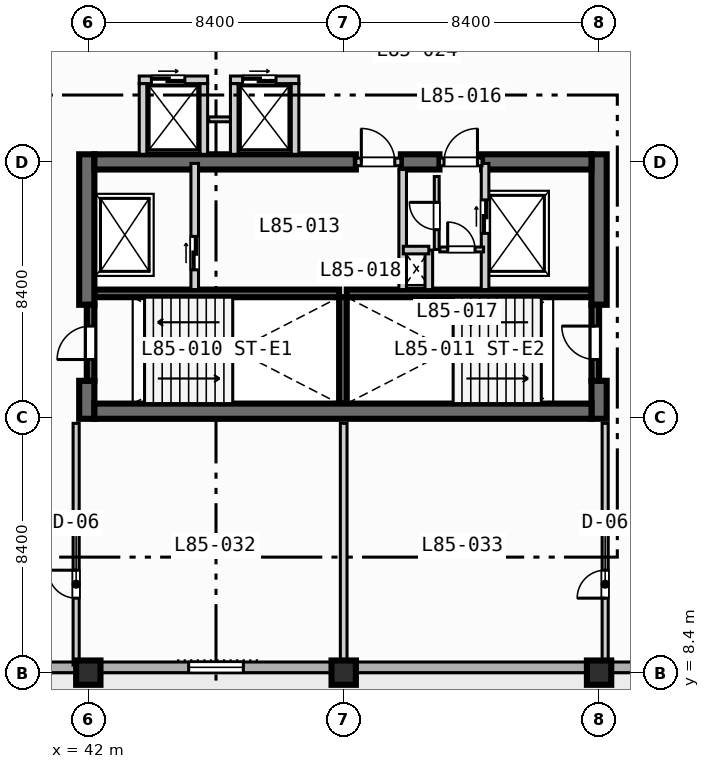
"""IFC4 building model, lengths in metres.
Left out: names, types, materials, properties, quantities, classifications, styles, units other than length and angle.
Written with IfcOpenShell. Run it as: python <this file> out.ifc"""

import sys

from ifc_helpers import new_model, si_unit, direction, frame, frame_2d, origin, origin_2d, place, context, subcontext, project, spatial, rectangle, extrude, element, fill, save


model = new_model("IFC4")
c1 = context("Model", 3, precision=1e-05, world=origin(), true_north=direction((0.0, 1.0)))
c2 = subcontext(c1, "Body", "Model", "MODEL_VIEW")
j1 = project(units=[si_unit("LENGTHUNIT", "METRE"), si_unit("PLANEANGLEUNIT", "RADIAN")], contexts=[c1])
p1 = place(None, origin())
s1 = spatial("IfcSite", under=j1, at=p1, CompositionType="ELEMENT")
p2 = place(p1, origin())
s2 = spatial("IfcBuilding", under=s1, at=p2, CompositionType="ELEMENT")
p3 = place(p2, frame((0.0, 0.0, 343.7)))
s3 = spatial("IfcBuildingStorey", under=s2, at=p3, CompositionType="ELEMENT", Elevation=343.7)
for number, where, z_axis, x_axis in (
    (1, (42.2, 20.875, 0.0), (0.0, 0.0, 1.0), (1.0, 0.0, 0.0)),
    (2, (50.5, 20.875, 0.0), (0.0, 0.0, 1.0), (1.0, 0.0, 0.0)),
):
    element("IfcWall", number, at=place(p3, frame(where, z_axis=z_axis, x_axis=x_axis)), inside=s3, PredefinedType="SOLIDWALL", context=c2, shape_type="SweptSolid", body=[
        extrude(rectangle(XDim=8.05, YDim=0.25, at=frame_2d((4.025, 0.0))), origin(), (0.0, 0.0, 1.0), 3.67),
    ])
p4 = place(p3, frame((50.375, 17.25, 0.0), z_axis=(0.0, 0.0, 1.0), x_axis=(0.0, 1.0, 0.0)))
e3 = element("IfcWall", 3, at=p4, inside=s3, PredefinedType="SOLIDWALL", context=c2, shape_type="SweptSolid", body=[
    extrude(rectangle(XDim=3.5, YDim=0.25, at=frame_2d((1.75, 0.0))), origin(), (0.0, 0.0, 1.0), 3.67),
])
p5 = place(p3, frame((41.95, 16.75, 0.0), z_axis=(0.0, 0.0, 1.0), x_axis=(0.0, 1.0, 0.0)))
e4 = element("IfcWall", 4, at=p5, inside=s3, PredefinedType="SHEAR", context=c2, shape_type="SweptSolid", body=[
    extrude(rectangle(XDim=1.25, YDim=0.5, at=frame_2d((0.625, 0.0))), origin(), (0.0, 0.0, 1.0), 3.67),
])
p6 = place(p3, frame((41.95, 20.5, 0.0), z_axis=(0.0, 0.0, 1.0), x_axis=(0.0, 1.0, 0.0)))
e5 = element("IfcWall", 5, at=p6, inside=s3, PredefinedType="SHEAR", context=c2, shape_type="SweptSolid", body=[
    extrude(rectangle(XDim=4.95, YDim=0.5, at=frame_2d((2.475, 0.0))), origin(), (0.0, 0.0, 1.0), 3.67),
])
p7 = place(p3, frame((58.8, 16.75, 0.0), z_axis=(0.0, 0.0, 1.0), x_axis=(0.0, 1.0, 0.0)))
e6 = element("IfcWall", 6, at=p7, inside=s3, PredefinedType="SHEAR", context=c2, shape_type="SweptSolid", body=[
    extrude(rectangle(XDim=1.25, YDim=0.5, at=frame_2d((0.625, 0.0))), origin(), (0.0, 0.0, 1.0), 3.67),
])
p8 = place(p3, frame((58.8, 20.5, 0.0), z_axis=(0.0, 0.0, 1.0), x_axis=(0.0, 1.0, 0.0)))
e7 = element("IfcWall", 7, at=p8, inside=s3, PredefinedType="SHEAR", context=c2, shape_type="SweptSolid", body=[
    extrude(rectangle(XDim=4.95, YDim=0.5, at=frame_2d((2.475, 0.0))), origin(), (0.0, 0.0, 1.0), 3.67),
])
p9 = place(p3, frame((42.2, 17.0, 0.0), z_axis=(0.0, 0.0, 1.0), x_axis=(1.0, 0.0, 0.0)))
e8 = element("IfcWall", 8, at=p9, inside=s3, PredefinedType="SHEAR", context=c2, shape_type="SweptSolid", body=[
    extrude(rectangle(XDim=16.35, YDim=0.5, at=frame_2d((8.175, 0.0))), origin(), (0.0, 0.0, 1.0), 3.67),
])
p10 = place(p3, frame((42.2, 25.2, 0.0), z_axis=(0.0, 0.0, 1.0), x_axis=(1.0, 0.0, 0.0)))
e9 = element("IfcWall", 9, at=p10, inside=s3, PredefinedType="SHEAR", context=c2, shape_type="SweptSolid", body=[
    extrude(rectangle(XDim=8.6, YDim=0.5, at=frame_2d((4.3, 0.0))), origin(), (0.0, 0.0, 1.0), 3.67),
])
p11 = place(p3, frame((52.28, 25.2, 0.0), z_axis=(0.0, 0.0, 1.0), x_axis=(1.0, 0.0, 0.0)))
e10 = element("IfcWall", 10, at=p11, inside=s3, PredefinedType="SHEAR", context=c2, shape_type="SweptSolid", body=[
    extrude(rectangle(XDim=1.27, YDim=0.5, at=frame_2d((0.635, 0.0))), origin(), (0.0, 0.0, 1.0), 3.67),
])
p12 = place(p3, frame((54.95, 25.2, 0.0), z_axis=(0.0, 0.0, 1.0), x_axis=(1.0, 0.0, 0.0)))
e11 = element("IfcWall", 11, at=p12, inside=s3, PredefinedType="SHEAR", context=c2, shape_type="SweptSolid", body=[
    extrude(rectangle(XDim=3.6, YDim=0.5, at=frame_2d((1.8, 0.0))), origin(), (0.0, 0.0, 1.0), 3.67),
])
for number, where, z_axis, x_axis in (
    (12, (42.0, 8.4, 0.0), (0.0, 0.0, 1.0), (1.0, 0.0, 0.0)),
    (13, (50.4, 8.4, 0.0), (0.0, 0.0, 1.0), (1.0, 0.0, 0.0)),
    (14, (58.8, 8.4, 0.0), (0.0, 0.0, 1.0), (1.0, 0.0, 0.0)),
):
    element("IfcColumn", number, at=place(p3, frame(where, z_axis=z_axis, x_axis=x_axis)), inside=s3, PredefinedType="COLUMN", context=c2, shape_type="SweptSolid", body=[
        extrude(rectangle(XDim=0.8, YDim=0.8, at=origin_2d()), origin(), (0.0, 0.0, 1.0), 3.9),
    ])
p13 = place(p3, frame((64.025, 8.575, 0.0), z_axis=(0.0, 0.0, 1.0), x_axis=(-1.0, 0.0, 0.0)))
e15 = element("IfcWall", 15, at=p13, inside=s3, PredefinedType="STANDARD", context=c2, shape_type="SweptSolid", body=[
    extrude(rectangle(XDim=52.45, YDim=0.35, at=frame_2d((26.225, 0.0))), origin(), (0.0, 0.0, 1.0), 3.67),
])
p14 = place(p13, frame((33.925, 0.0, 0.0)))
e16 = element("IfcOpeningElement", 16, at=p14, cuts=e15, PredefinedType="OPENING", context=c2, shape_type="SweptSolid", body=[
    extrude(rectangle(XDim=1.4, YDim=2.2, at=frame_2d((0.7, 1.1))), frame((0.0, 0.185, 0.0), z_axis=(0.0, -1.0, 0.0), x_axis=(1.0, 0.0, 0.0)), (0.0, 0.0, 1.0), 0.37),
])
p15 = place(p13, frame((25.025, 0.0, 0.85)))
e17 = element("IfcOpeningElement", 17, at=p15, cuts=e15, PredefinedType="OPENING", context=c2, shape_type="SweptSolid", body=[
    extrude(rectangle(XDim=2.4, YDim=1.95, at=frame_2d((1.2, 0.975))), frame((0.0, 0.185, 0.0), z_axis=(0.0, -1.0, 0.0), x_axis=(1.0, 0.0, 0.0)), (0.0, 0.0, 1.0), 0.37),
])
p16 = place(p13, frame((16.925, 0.0, 0.85)))
e18 = element("IfcOpeningElement", 18, at=p16, cuts=e15, PredefinedType="OPENING", context=c2, shape_type="SweptSolid", body=[
    extrude(rectangle(XDim=1.8, YDim=1.8, at=frame_2d((0.9, 0.9))), frame((0.0, 0.185, 0.0), z_axis=(0.0, -1.0, 0.0), x_axis=(1.0, 0.0, 0.0)), (0.0, 0.0, 1.0), 0.37),
])
p17 = place(p13, frame((41.815, 0.0, 0.85)))
e19 = element("IfcOpeningElement", 19, at=p17, cuts=e15, PredefinedType="OPENING", context=c2, shape_type="SweptSolid", body=[
    extrude(rectangle(XDim=1.8, YDim=1.8, at=frame_2d((0.9, 0.9))), frame((0.0, 0.185, 0.0), z_axis=(0.0, -1.0, 0.0), x_axis=(1.0, 0.0, 0.0)), (0.0, 0.0, 1.0), 0.37),
])
p18 = place(p13, frame((49.535, 0.0, 0.85)))
e20 = element("IfcOpeningElement", 20, at=p18, cuts=e15, PredefinedType="OPENING", context=c2, shape_type="SweptSolid", body=[
    extrude(rectangle(XDim=1.8, YDim=1.8, at=frame_2d((0.9, 0.9))), frame((0.0, 0.185, 0.0), z_axis=(0.0, -1.0, 0.0), x_axis=(1.0, 0.0, 0.0)), (0.0, 0.0, 1.0), 0.37),
])
p19 = place(p3, frame((42.075, 18.0, 0.0), z_axis=(0.0, 0.0, 1.0), x_axis=(0.0, 1.0, 0.0)))
e21 = element("IfcWall", 21, at=p19, inside=s3, PredefinedType="SOLIDWALL", context=c2, shape_type="SweptSolid", body=[
    extrude(rectangle(XDim=2.5, YDim=0.25, at=frame_2d((1.25, 0.0))), origin(), (0.0, 0.0, 1.0), 3.67),
])
p20 = place(p19, frame((0.7, 0.0, 0.0)))
e22 = element("IfcOpeningElement", 22, at=p20, cuts=e21, PredefinedType="OPENING", context=c2, shape_type="SweptSolid", body=[
    extrude(rectangle(XDim=1.1, YDim=2.15, at=frame_2d((0.55, 1.075))), frame((0.0, 0.135, 0.0), z_axis=(0.0, -1.0, 0.0), x_axis=(1.0, 0.0, 0.0)), (0.0, 0.0, 1.0), 0.27),
])
p21 = place(p3, frame((58.675, 18.0, 0.0), z_axis=(0.0, 0.0, 1.0), x_axis=(0.0, 1.0, 0.0)))
e23 = element("IfcWall", 23, at=p21, inside=s3, PredefinedType="SOLIDWALL", context=c2, shape_type="SweptSolid", body=[
    extrude(rectangle(XDim=2.5, YDim=0.25, at=frame_2d((1.25, 0.0))), origin(), (0.0, 0.0, 1.0), 3.67),
])
p22 = place(p21, frame((0.7, 0.0, 0.0)))
e24 = element("IfcOpeningElement", 24, at=p22, cuts=e23, PredefinedType="OPENING", context=c2, shape_type="SweptSolid", body=[
    extrude(rectangle(XDim=1.1, YDim=2.15, at=frame_2d((0.55, 1.075))), frame((0.0, 0.135, 0.0), z_axis=(0.0, -1.0, 0.0), x_axis=(1.0, 0.0, 0.0)), (0.0, 0.0, 1.0), 0.27),
])
p23 = place(p3, frame((45.5, 21.0, 0.0), z_axis=(0.0, 0.0, 1.0), x_axis=(0.0, 1.0, 0.0)))
e25 = element("IfcWall", 25, at=p23, inside=s3, PredefinedType="SOLIDWALL", context=c2, shape_type="SweptSolid", body=[
    extrude(rectangle(XDim=4.15, YDim=0.25, at=frame_2d((2.075, 0.0))), origin(), (0.0, 0.0, 1.0), 3.67),
])
p24 = place(p23, frame((0.65, 0.0, 0.0)))
e26 = element("IfcOpeningElement", 26, at=p24, cuts=e25, PredefinedType="OPENING", context=c2, shape_type="SweptSolid", body=[
    extrude(rectangle(XDim=1.1, YDim=2.15, at=frame_2d((0.55, 1.075))), frame((0.0, 0.135, 0.0), z_axis=(0.0, -1.0, 0.0), x_axis=(1.0, 0.0, 0.0)), (0.0, 0.0, 1.0), 0.27),
])
p25 = place(p3, frame((50.8, 25.2, 0.0), z_axis=(0.0, 0.0, 1.0), x_axis=(1.0, 0.0, 0.0)))
e27 = element("IfcWall", 27, at=p25, inside=s3, PredefinedType="SOLIDWALL", context=c2, shape_type="SweptSolid", body=[
    extrude(rectangle(XDim=1.48, YDim=0.25, at=frame_2d((0.74, 0.0))), origin(), (0.0, 0.0, 1.0), 3.67),
])
p26 = place(p25, frame((0.18, 0.0, 0.0)))
e28 = element("IfcOpeningElement", 28, at=p26, cuts=e27, PredefinedType="OPENING", context=c2, shape_type="SweptSolid", body=[
    extrude(rectangle(XDim=1.1, YDim=2.15, at=frame_2d((0.55, 1.075))), frame((0.0, 0.135, 0.0), z_axis=(0.0, -1.0, 0.0), x_axis=(1.0, 0.0, 0.0)), (0.0, 0.0, 1.0), 0.27),
])
p27 = place(p3, frame((52.34, 21.0, 0.0), z_axis=(0.0, 0.0, 1.0), x_axis=(0.0, 1.0, 0.0)))
e29 = element("IfcWall", 29, at=p27, inside=s3, PredefinedType="SOLIDWALL", context=c2, shape_type="SweptSolid", body=[
    extrude(rectangle(XDim=3.95, YDim=0.25, at=frame_2d((1.975, 0.0))), origin(), (0.0, 0.0, 1.0), 3.67),
])
p28 = place(p3, frame((55.05, 21.0, 0.0), z_axis=(0.0, 0.0, 1.0), x_axis=(0.0, 1.0, 0.0)))
e30 = element("IfcWall", 30, at=p28, inside=s3, PredefinedType="SOLIDWALL", context=c2, shape_type="SweptSolid", body=[
    extrude(rectangle(XDim=4.15, YDim=0.25, at=frame_2d((2.075, 0.0))), origin(), (0.0, 0.0, 1.0), 3.67),
])
p29 = place(p28, frame((1.85, 0.0, 0.0)))
e31 = element("IfcOpeningElement", 31, at=p29, cuts=e30, PredefinedType="OPENING", context=c2, shape_type="SweptSolid", body=[
    extrude(rectangle(XDim=1.1, YDim=2.15, at=frame_2d((0.55, 1.075))), frame((0.0, 0.135, 0.0), z_axis=(0.0, -1.0, 0.0), x_axis=(1.0, 0.0, 0.0)), (0.0, 0.0, 1.0), 0.27),
])
p30 = place(p3, frame((53.55, 25.2, 0.0), z_axis=(0.0, 0.0, 1.0), x_axis=(1.0, 0.0, 0.0)))
e32 = element("IfcWall", 32, at=p30, inside=s3, PredefinedType="SOLIDWALL", context=c2, shape_type="SweptSolid", body=[
    extrude(rectangle(XDim=1.4, YDim=0.25, at=frame_2d((0.7, 0.0))), origin(), (0.0, 0.0, 1.0), 3.67),
])
p31 = place(p30, frame((0.15, 0.0, 0.0)))
e33 = element("IfcOpeningElement", 33, at=p31, cuts=e32, PredefinedType="OPENING", context=c2, shape_type="SweptSolid", body=[
    extrude(rectangle(XDim=1.1, YDim=2.15, at=frame_2d((0.55, 1.075))), frame((0.0, 0.135, 0.0), z_axis=(0.0, -1.0, 0.0), x_axis=(1.0, 0.0, 0.0)), (0.0, 0.0, 1.0), 0.27),
])
p32 = place(p3, frame((53.2, 21.0, 0.0), z_axis=(0.0, 0.0, 1.0), x_axis=(0.0, 1.0, 0.0)))
e34 = element("IfcWall", 34, at=p32, inside=s3, PredefinedType="SOLIDWALL", context=c2, shape_type="SweptSolid", body=[
    extrude(rectangle(XDim=1.3, YDim=0.25, at=frame_2d((0.65, 0.0))), origin(), (0.0, 0.0, 1.0), 3.67),
])
p33 = place(p3, frame((52.36, 22.3, 0.0), z_axis=(0.0, 0.0, 1.0), x_axis=(1.0, 0.0, 0.0)))
e35 = element("IfcWall", 35, at=p33, inside=s3, PredefinedType="SOLIDWALL", context=c2, shape_type="SweptSolid", body=[
    extrude(rectangle(XDim=0.84, YDim=0.25, at=frame_2d((0.42, 0.0))), origin(), (0.0, 0.0, 1.0), 3.67),
])
p34 = place(p3, frame((53.56, 22.32, 0.0), z_axis=(0.0, 0.0, 1.0), x_axis=(1.0, 0.0, 0.0)))
e36 = element("IfcWall", 36, at=p34, inside=s3, PredefinedType="PARTITIONING", context=c2, shape_type="SweptSolid", body=[
    extrude(rectangle(XDim=1.44, YDim=0.16, at=frame_2d((0.72, 0.0))), origin(), (0.0, 0.0, 1.0), 3.67),
])
p35 = place(p34, frame((0.26, 0.0, 0.0)))
e37 = element("IfcOpeningElement", 37, at=p35, cuts=e36, PredefinedType="OPENING", context=c2, shape_type="SweptSolid", body=[
    extrude(rectangle(XDim=0.9, YDim=2.1, at=frame_2d((0.45, 1.05))), frame((0.0, 0.09, 0.0), z_axis=(0.0, -1.0, 0.0), x_axis=(1.0, 0.0, 0.0)), (0.0, 0.0, 1.0), 0.18),
])
p36 = place(p3, frame((53.46, 22.32, 0.0), z_axis=(0.0, 0.0, 1.0), x_axis=(0.0, 1.0, 0.0)))
e38 = element("IfcWall", 38, at=p36, inside=s3, PredefinedType="PARTITIONING", context=c2, shape_type="SweptSolid", body=[
    extrude(rectangle(XDim=2.4, YDim=0.16, at=frame_2d((1.2, 0.0))), origin(), (0.0, 0.0, 1.0), 3.67),
])
p37 = place(p36, frame((0.65, 0.0, 0.0)))
e39 = element("IfcOpeningElement", 39, at=p37, cuts=e38, PredefinedType="OPENING", context=c2, shape_type="SweptSolid", body=[
    extrude(rectangle(XDim=0.9, YDim=2.1, at=frame_2d((0.45, 1.05))), frame((0.0, 0.09, 0.0), z_axis=(0.0, -1.0, 0.0), x_axis=(1.0, 0.0, 0.0)), (0.0, 0.0, 1.0), 0.18),
])
p38 = place(p3, frame((43.675, 27.9, 0.0), z_axis=(0.0, 0.0, 1.0), x_axis=(1.0, 0.0, 0.0)))
e40 = element("IfcWall", 40, at=p38, inside=s3, PredefinedType="SOLIDWALL", context=c2, shape_type="SweptSolid", body=[
    extrude(rectangle(XDim=2.25, YDim=0.25, at=frame_2d((1.125, 0.0))), origin(), (0.0, 0.0, 1.0), 3.67),
])
p39 = place(p38, frame((0.4, 0.0, 0.0)))
e41 = element("IfcOpeningElement", 41, at=p39, cuts=e40, PredefinedType="OPENING", context=c2, shape_type="SweptSolid", body=[
    extrude(rectangle(XDim=1.1, YDim=2.15, at=frame_2d((0.55, 1.075))), frame((0.0, 0.135, 0.0), z_axis=(0.0, -1.0, 0.0), x_axis=(1.0, 0.0, 0.0)), (0.0, 0.0, 1.0), 0.27),
])
for number, where, z_axis, x_axis in (
    (42, (43.8, 25.45, 0.0), (0.0, 0.0, 1.0), (0.0, 1.0, 0.0)),
    (43, (45.8, 25.45, 0.0), (0.0, 0.0, 1.0), (0.0, 1.0, 0.0)),
):
    element("IfcWall", number, at=place(p3, frame(where, z_axis=z_axis, x_axis=x_axis)), inside=s3, PredefinedType="SOLIDWALL", context=c2, shape_type="SweptSolid", body=[
        extrude(rectangle(XDim=2.325, YDim=0.25, at=frame_2d((1.163, 0.0))), origin(), (0.0, 0.0, 1.0), 3.67),
    ])
p40 = place(p3, frame((45.96, 26.6, 0.0), z_axis=(0.0, 0.0, 1.0), x_axis=(1.0, 0.0, 0.0)))
e44 = element("IfcWall", 44, at=p40, inside=s3, PredefinedType="PARTITIONING", context=c2, shape_type="SweptSolid", body=[
    extrude(rectangle(XDim=0.88, YDim=0.16, at=frame_2d((0.44, 0.0))), origin(), (0.0, 0.0, 1.0), 3.67),
])
p41 = place(p3, frame((46.675, 27.9, 0.0), z_axis=(0.0, 0.0, 1.0), x_axis=(1.0, 0.0, 0.0)))
e45 = element("IfcWall", 45, at=p41, inside=s3, PredefinedType="SOLIDWALL", context=c2, shape_type="SweptSolid", body=[
    extrude(rectangle(XDim=2.25, YDim=0.25, at=frame_2d((1.125, 0.0))), origin(), (0.0, 0.0, 1.0), 3.67),
])
p42 = place(p41, frame((0.4, 0.0, 0.0)))
e46 = element("IfcOpeningElement", 46, at=p42, cuts=e45, PredefinedType="OPENING", context=c2, shape_type="SweptSolid", body=[
    extrude(rectangle(XDim=1.1, YDim=2.15, at=frame_2d((0.55, 1.075))), frame((0.0, 0.135, 0.0), z_axis=(0.0, -1.0, 0.0), x_axis=(1.0, 0.0, 0.0)), (0.0, 0.0, 1.0), 0.27),
])
for number, where, z_axis, x_axis in (
    (47, (46.8, 25.45, 0.0), (0.0, 0.0, 1.0), (0.0, 1.0, 0.0)),
    (48, (48.8, 25.45, 0.0), (0.0, 0.0, 1.0), (0.0, 1.0, 0.0)),
):
    element("IfcWall", number, at=place(p3, frame(where, z_axis=z_axis, x_axis=x_axis)), inside=s3, PredefinedType="SOLIDWALL", context=c2, shape_type="SweptSolid", body=[
        extrude(rectangle(XDim=2.325, YDim=0.25, at=frame_2d((1.163, 0.0))), origin(), (0.0, 0.0, 1.0), 3.67),
    ])
p43 = place(p3, frame((41.6, 8.65, 0.0), z_axis=(0.0, 0.0, 1.0), x_axis=(0.0, 1.0, 0.0)))
e49 = element("IfcWall", 49, at=p43, inside=s3, PredefinedType="PARTITIONING", context=c2, shape_type="SweptSolid", body=[
    extrude(rectangle(XDim=7.95, YDim=0.2, at=frame_2d((3.975, 0.0))), origin(), (0.0, 0.0, 1.0), 3.67),
])
p44 = place(p43, frame((2.2, 0.0, 0.0)))
e50 = element("IfcOpeningElement", 50, at=p44, cuts=e49, PredefinedType="OPENING", context=c2, shape_type="SweptSolid", body=[
    extrude(rectangle(XDim=0.92, YDim=2.1, at=frame_2d((0.46, 1.05))), frame((0.0, 0.11, 0.0), z_axis=(0.0, -1.0, 0.0), x_axis=(1.0, 0.0, 0.0)), (0.0, 0.0, 1.0), 0.22),
])
p45 = place(p3, frame((59.0, 8.65, 0.0), z_axis=(0.0, 0.0, 1.0), x_axis=(0.0, 1.0, 0.0)))
e51 = element("IfcWall", 51, at=p45, inside=s3, PredefinedType="PARTITIONING", context=c2, shape_type="SweptSolid", body=[
    extrude(rectangle(XDim=7.95, YDim=0.2, at=frame_2d((3.975, 0.0))), origin(), (0.0, 0.0, 1.0), 3.07),
])
p46 = place(p45, frame((2.2, 0.0, 0.0)))
e52 = element("IfcOpeningElement", 52, at=p46, cuts=e51, PredefinedType="OPENING", context=c2, shape_type="SweptSolid", body=[
    extrude(rectangle(XDim=0.92, YDim=2.1, at=frame_2d((0.46, 1.05))), frame((0.0, 0.11, 0.0), z_axis=(0.0, -1.0, 0.0), x_axis=(1.0, 0.0, 0.0)), (0.0, 0.0, 1.0), 0.22),
])
p47 = place(p3, frame((50.4, 8.65, 0.0), z_axis=(0.0, 0.0, 1.0), x_axis=(0.0, 1.0, 0.0)))
e53 = element("IfcWall", 53, at=p47, inside=s3, PredefinedType="PARTITIONING", context=c2, shape_type="SweptSolid", body=[
    extrude(rectangle(XDim=7.95, YDim=0.22, at=frame_2d((3.975, 0.0))), origin(), (0.0, 0.0, 1.0), 3.053),
])
p48 = place(p16, origin())
e54 = element("IfcWindow", 54, at=p48, inside=s3, PartitioningType="SINGLE_PANEL", PredefinedType="WINDOW", context=c2, shape_type="SweptSolid", body=[
    extrude(rectangle(XDim=1.8, YDim=1.8, at=frame_2d((0.9, 0.9))), frame((0.0, 0.03, 0.0), z_axis=(0.0, -1.0, 0.0), x_axis=(1.0, 0.0, 0.0)), (0.0, 0.0, 1.0), 0.06),
])
fill(e18, e54)
p49 = place(p20, origin())
e55 = element("IfcDoor", 55, at=p49, inside=s3, OperationType="SINGLE_SWING_LEFT", PredefinedType="DOOR", context=c2, shape_type="SweptSolid", body=[
    extrude(rectangle(XDim=1.1, YDim=2.15, at=frame_2d((0.55, 1.075))), frame((0.0, 0.025, 0.0), z_axis=(0.0, -1.0, 0.0), x_axis=(1.0, 0.0, 0.0)), (0.0, 0.0, 1.0), 0.05),
])
fill(e22, e55)
p50 = place(p22, origin())
e56 = element("IfcDoor", 56, at=p50, inside=s3, OperationType="SINGLE_SWING_RIGHT", PredefinedType="DOOR", context=c2, shape_type="SweptSolid", body=[
    extrude(rectangle(XDim=1.1, YDim=2.15, at=frame_2d((0.55, 1.075))), frame((0.0, 0.025, 0.0), z_axis=(0.0, -1.0, 0.0), x_axis=(1.0, 0.0, 0.0)), (0.0, 0.0, 1.0), 0.05),
])
fill(e24, e56)
p51 = place(p24, origin())
e57 = element("IfcDoor", 57, at=p51, inside=s3, OperationType="SLIDING_TO_LEFT", PredefinedType="DOOR", context=c2, shape_type="SweptSolid", body=[
    extrude(rectangle(XDim=1.1, YDim=2.15, at=frame_2d((0.55, 1.075))), frame((0.0, 0.025, 0.0), z_axis=(0.0, -1.0, 0.0), x_axis=(1.0, 0.0, 0.0)), (0.0, 0.0, 1.0), 0.05),
])
fill(e26, e57)
p52 = place(p26, origin())
e58 = element("IfcDoor", 58, at=p52, inside=s3, OperationType="SINGLE_SWING_LEFT", PredefinedType="DOOR", context=c2, shape_type="SweptSolid", body=[
    extrude(rectangle(XDim=1.1, YDim=2.15, at=frame_2d((0.55, 1.075))), frame((0.0, 0.025, 0.0), z_axis=(0.0, -1.0, 0.0), x_axis=(1.0, 0.0, 0.0)), (0.0, 0.0, 1.0), 0.05),
])
fill(e28, e58)
p53 = place(p29, origin())
e59 = element("IfcDoor", 59, at=p53, inside=s3, OperationType="SLIDING_TO_LEFT", PredefinedType="DOOR", context=c2, shape_type="SweptSolid", body=[
    extrude(rectangle(XDim=1.1, YDim=2.15, at=frame_2d((0.55, 1.075))), frame((0.0, 0.025, 0.0), z_axis=(0.0, -1.0, 0.0), x_axis=(1.0, 0.0, 0.0)), (0.0, 0.0, 1.0), 0.05),
])
fill(e31, e59)
p54 = place(p31, origin())
e60 = element("IfcDoor", 60, at=p54, inside=s3, OperationType="SINGLE_SWING_RIGHT", PredefinedType="DOOR", context=c2, shape_type="SweptSolid", body=[
    extrude(rectangle(XDim=1.1, YDim=2.15, at=frame_2d((0.55, 1.075))), frame((0.0, 0.025, 0.0), z_axis=(0.0, -1.0, 0.0), x_axis=(1.0, 0.0, 0.0)), (0.0, 0.0, 1.0), 0.05),
])
fill(e33, e60)
p55 = place(p35, origin())
e61 = element("IfcDoor", 61, at=p55, inside=s3, OperationType="SINGLE_SWING_LEFT", PredefinedType="DOOR", context=c2, shape_type="SweptSolid", body=[
    extrude(rectangle(XDim=0.9, YDim=2.1, at=frame_2d((0.45, 1.05))), frame((0.0, 0.025, 0.0), z_axis=(0.0, -1.0, 0.0), x_axis=(1.0, 0.0, 0.0)), (0.0, 0.0, 1.0), 0.05),
])
fill(e37, e61)
p56 = place(p37, origin())
e62 = element("IfcDoor", 62, at=p56, inside=s3, OperationType="SINGLE_SWING_RIGHT", PredefinedType="DOOR", context=c2, shape_type="SweptSolid", body=[
    extrude(rectangle(XDim=0.9, YDim=2.1, at=frame_2d((0.45, 1.05))), frame((0.0, 0.025, 0.0), z_axis=(0.0, -1.0, 0.0), x_axis=(1.0, 0.0, 0.0)), (0.0, 0.0, 1.0), 0.05),
])
fill(e39, e62)
p57 = place(p39, origin())
e63 = element("IfcDoor", 63, at=p57, inside=s3, OperationType="SLIDING_TO_LEFT", PredefinedType="DOOR", context=c2, shape_type="SweptSolid", body=[
    extrude(rectangle(XDim=1.1, YDim=2.15, at=frame_2d((0.55, 1.075))), frame((0.0, 0.025, 0.0), z_axis=(0.0, -1.0, 0.0), x_axis=(1.0, 0.0, 0.0)), (0.0, 0.0, 1.0), 0.05),
])
fill(e41, e63)
p58 = place(p42, origin())
e64 = element("IfcDoor", 64, at=p58, inside=s3, OperationType="SLIDING_TO_LEFT", PredefinedType="DOOR", context=c2, shape_type="SweptSolid", body=[
    extrude(rectangle(XDim=1.1, YDim=2.15, at=frame_2d((0.55, 1.075))), frame((0.0, 0.025, 0.0), z_axis=(0.0, -1.0, 0.0), x_axis=(1.0, 0.0, 0.0)), (0.0, 0.0, 1.0), 0.05),
])
fill(e46, e64)
p59 = place(p44, origin())
e65 = element("IfcDoor", 65, at=p59, inside=s3, OperationType="SINGLE_SWING_RIGHT", PredefinedType="DOOR", context=c2, shape_type="SweptSolid", body=[
    extrude(rectangle(XDim=0.92, YDim=2.1, at=frame_2d((0.46, 1.05))), frame((0.0, 0.025, 0.0), z_axis=(0.0, -1.0, 0.0), x_axis=(1.0, 0.0, 0.0)), (0.0, 0.0, 1.0), 0.05),
])
fill(e50, e65)
p60 = place(p46, origin())
e66 = element("IfcDoor", 66, at=p60, inside=s3, OperationType="SINGLE_SWING_LEFT", PredefinedType="DOOR", context=c2, shape_type="SweptSolid", body=[
    extrude(rectangle(XDim=0.92, YDim=2.1, at=frame_2d((0.46, 1.05))), frame((0.0, 0.025, 0.0), z_axis=(0.0, -1.0, 0.0), x_axis=(1.0, 0.0, 0.0)), (0.0, 0.0, 1.0), 0.05),
])
fill(e52, e66)
save(model, sys.argv[1])
